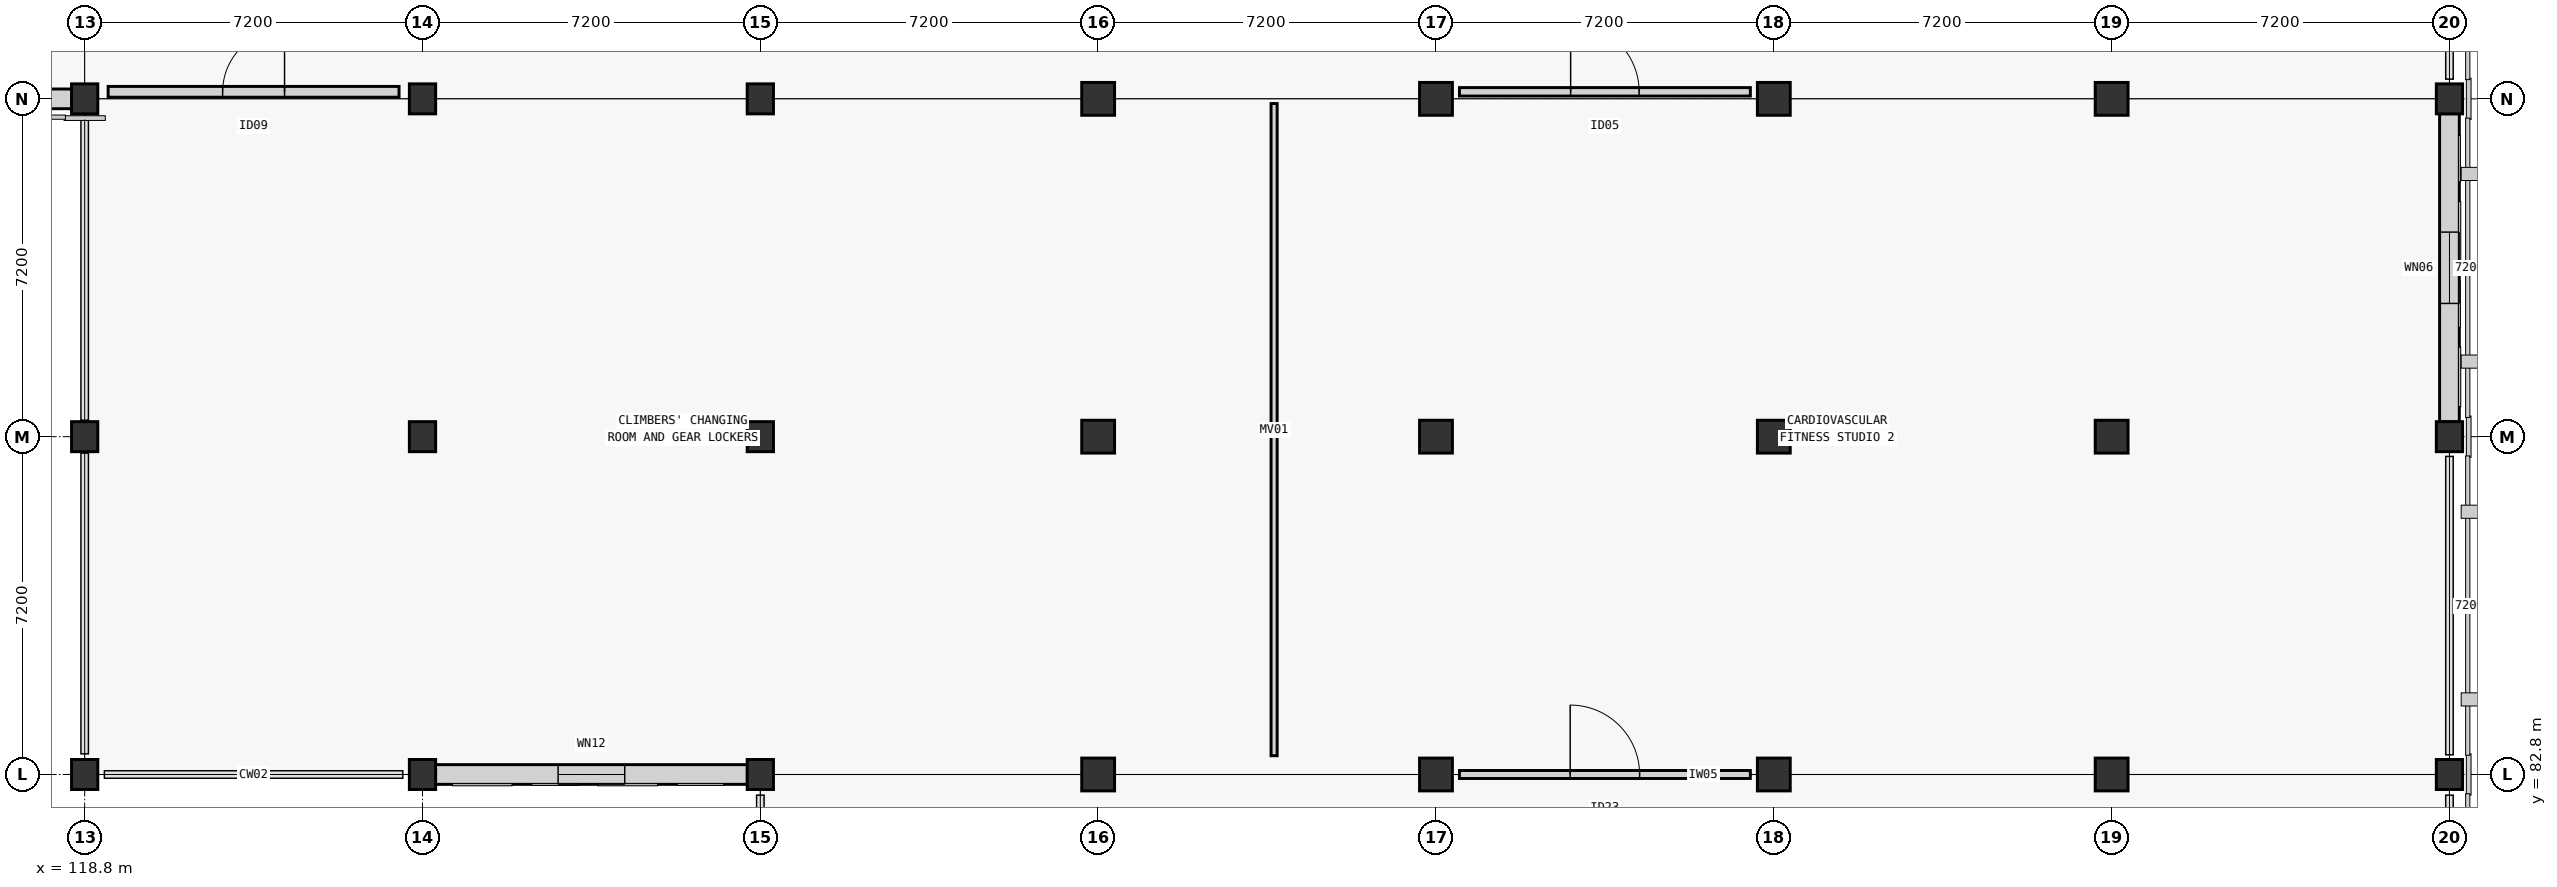
"""IFC4 building model, lengths in metres.
Left out: names, types, materials, properties, quantities, classifications, styles, units other than length and angle.
Written with IfcOpenShell. Run it as: python <this file> out.ifc"""

import sys

from ifc_helpers import new_model, si_unit, direction, frame, frame_2d, origin, origin_2d, place, context, subcontext, project, spatial, rectangle, extrude, element, fill, save


model = new_model("IFC4")
c1 = context("Model", 3, precision=1e-05, world=origin(), true_north=direction((0.0, 1.0)))
c2 = subcontext(c1, "Body", "Model", "MODEL_VIEW")
j1 = project(units=[si_unit("LENGTHUNIT", "METRE"), si_unit("PLANEANGLEUNIT", "RADIAN")], contexts=[c1])
p1 = place(None, origin())
s1 = spatial("IfcSite", under=j1, at=p1, CompositionType="ELEMENT")
p2 = place(p1, origin())
s2 = spatial("IfcBuilding", under=s1, at=p2, CompositionType="ELEMENT")
p3 = place(p2, origin())
s3 = spatial("IfcBuildingStorey", under=s2, at=p3, CompositionType="ELEMENT", Elevation=0.0)
for number, where, z_axis, x_axis in (
    (1, (118.8, 82.8, -0.3), (0.0, 0.0, 1.0), (1.0, 0.0, 0.0)),
    (2, (118.8, 90.0, -0.3), (0.0, 0.0, 1.0), (1.0, 0.0, 0.0)),
    (3, (118.8, 97.2, -0.3), (0.0, 0.0, 1.0), (1.0, 0.0, 0.0)),
    (4, (126.0, 82.8, -0.3), (0.0, 0.0, 1.0), (1.0, 0.0, 0.0)),
    (5, (126.0, 90.0, -0.3), (0.0, 0.0, 1.0), (1.0, 0.0, 0.0)),
    (6, (126.0, 97.2, -0.3), (0.0, 0.0, 1.0), (1.0, 0.0, 0.0)),
    (7, (133.2, 82.8, -0.3), (0.0, 0.0, 1.0), (1.0, 0.0, 0.0)),
    (8, (133.2, 90.0, -0.3), (0.0, 0.0, 1.0), (1.0, 0.0, 0.0)),
    (9, (133.2, 97.2, -0.3), (0.0, 0.0, 1.0), (1.0, 0.0, 0.0)),
):
    element("IfcColumn", number, at=place(p3, frame(where, z_axis=z_axis, x_axis=x_axis)), inside=s3, PredefinedType="COLUMN", context=c2, shape_type="SweptSolid", body=[
        extrude(rectangle(XDim=0.56, YDim=0.64, at=origin_2d()), origin(), (0.0, 0.0, 1.0), 5.7),
    ])
for number, where, z_axis, x_axis in (
    (10, (140.4, 82.8, -0.3), (0.0, 0.0, 1.0), (1.0, 0.0, 0.0)),
    (11, (140.4, 90.0, -0.3), (0.0, 0.0, 1.0), (1.0, 0.0, 0.0)),
    (12, (140.4, 97.2, -0.3), (0.0, 0.0, 1.0), (1.0, 0.0, 0.0)),
    (13, (147.6, 82.8, -0.3), (0.0, 0.0, 1.0), (1.0, 0.0, 0.0)),
    (14, (147.6, 90.0, -0.3), (0.0, 0.0, 1.0), (1.0, 0.0, 0.0)),
    (15, (147.6, 97.2, -0.3), (0.0, 0.0, 1.0), (1.0, 0.0, 0.0)),
    (16, (154.8, 82.8, -0.3), (0.0, 0.0, 1.0), (1.0, 0.0, 0.0)),
    (17, (154.8, 90.0, -0.3), (0.0, 0.0, 1.0), (1.0, 0.0, 0.0)),
    (18, (154.8, 97.2, -0.3), (0.0, 0.0, 1.0), (1.0, 0.0, 0.0)),
    (19, (162.0, 82.8, -0.3), (0.0, 0.0, 1.0), (1.0, 0.0, 0.0)),
    (20, (162.0, 90.0, -0.3), (0.0, 0.0, 1.0), (1.0, 0.0, 0.0)),
    (21, (162.0, 97.2, -0.3), (0.0, 0.0, 1.0), (1.0, 0.0, 0.0)),
):
    element("IfcColumn", number, at=place(p3, frame(where, z_axis=z_axis, x_axis=x_axis)), inside=s3, PredefinedType="COLUMN", context=c2, shape_type="SweptSolid", body=[
        extrude(rectangle(XDim=0.7, YDim=0.7, at=origin_2d()), origin(), (0.0, 0.0, 1.0), 5.7),
    ])
for number, where, z_axis, x_axis in (
    (22, (169.2, 82.8, -0.3), (0.0, 0.0, 1.0), (1.0, 0.0, 0.0)),
    (23, (169.2, 90.0, -0.3), (0.0, 0.0, 1.0), (1.0, 0.0, 0.0)),
    (24, (169.2, 97.2, -0.3), (0.0, 0.0, 1.0), (1.0, 0.0, 0.0)),
):
    element("IfcColumn", number, at=place(p3, frame(where, z_axis=z_axis, x_axis=x_axis)), inside=s3, PredefinedType="COLUMN", context=c2, shape_type="SweptSolid", body=[
        extrude(rectangle(XDim=0.56, YDim=0.64, at=origin_2d()), origin(), (0.0, 0.0, 1.0), 5.7),
    ])
p4 = place(p3, frame((169.2, 96.884, 0.0), z_axis=(0.0, 0.0, 1.0), x_axis=(0.0, -1.0, 0.0)))
e25 = element("IfcWall", 25, at=p4, inside=s3, PredefinedType="STANDARD", context=c2, shape_type="SweptSolid", body=[
    extrude(rectangle(XDim=6.568, YDim=0.42, at=frame_2d((3.284, 0.0))), origin(), (0.0, 0.0, 1.0), 4.505),
])
p5 = place(p4, frame((2.524, 0.0, 0.9)))
e26 = element("IfcOpeningElement", 26, at=p5, cuts=e25, PredefinedType="OPENING", context=c2, shape_type="SweptSolid", body=[
    extrude(rectangle(XDim=1.52, YDim=2.75, at=frame_2d((0.76, 1.375))), frame((0.0, 0.21, 0.0), z_axis=(0.0, -1.0, 0.0), x_axis=(1.0, 0.0, 0.0)), (0.0, 0.0, 1.0), 0.42),
])
p6 = place(p3, frame((118.524, 97.2, 0.0), z_axis=(0.0, 0.0, 1.0), x_axis=(-1.0, 0.0, 0.0)))
e27 = element("IfcWall", 27, at=p6, inside=s3, PredefinedType="STANDARD", context=c2, shape_type="SweptSolid", body=[
    extrude(rectangle(XDim=6.648, YDim=0.42, at=frame_2d((3.324, 0.0))), origin(), (0.0, 0.0, 1.0), 4.515),
])
p7 = place(p6, frame((1.799, 0.0, 0.9)))
e28 = element("IfcOpeningElement", 28, at=p7, cuts=e27, PredefinedType="OPENING", context=c2, shape_type="SweptSolid", body=[
    extrude(rectangle(XDim=3.05, YDim=1.62, at=frame_2d((1.525, 0.81))), frame((0.0, 0.21, 0.0), z_axis=(0.0, -1.0, 0.0), x_axis=(1.0, 0.0, 0.0)), (0.0, 0.0, 1.0), 0.42),
])
p8 = place(p3, frame((132.924, 82.8, 0.0), z_axis=(0.0, 0.0, 1.0), x_axis=(-1.0, 0.0, 0.0)))
e29 = element("IfcWall", 29, at=p8, inside=s3, PredefinedType="STANDARD", context=c2, shape_type="SweptSolid", body=[
    extrude(rectangle(XDim=6.648, YDim=0.42, at=frame_2d((3.324, 0.0))), origin(), (0.0, 0.0, 1.0), 4.505),
])
p9 = place(p8, frame((2.614, 0.0, 0.9)))
e30 = element("IfcOpeningElement", 30, at=p9, cuts=e29, PredefinedType="OPENING", context=c2, shape_type="SweptSolid", body=[
    extrude(rectangle(XDim=1.42, YDim=1.62, at=frame_2d((0.71, 0.81))), frame((0.0, 0.21, 0.0), z_axis=(0.0, -1.0, 0.0), x_axis=(1.0, 0.0, 0.0)), (0.0, 0.0, 1.0), 0.42),
])
p10 = place(p3, frame((148.1, 82.8, 0.0), z_axis=(0.0, 0.0, 1.0), x_axis=(1.0, 0.0, 0.0)))
e31 = element("IfcWall", 31, at=p10, inside=s3, PredefinedType="STANDARD", context=c2, shape_type="SweptSolid", body=[
    extrude(rectangle(XDim=6.2, YDim=0.17, at=frame_2d((3.1, 0.0))), origin(), (0.0, 0.0, 1.0), 4.2),
])
p11 = place(p10, frame((2.36, 0.0, 0.0)))
e32 = element("IfcOpeningElement", 32, at=p11, cuts=e31, PredefinedType="OPENING", context=c2, shape_type="SweptSolid", body=[
    extrude(rectangle(XDim=1.48, YDim=2.22, at=frame_2d((0.74, 1.11))), frame((0.0, 0.085, 0.0), z_axis=(0.0, -1.0, 0.0), x_axis=(1.0, 0.0, 0.0)), (0.0, 0.0, 1.0), 0.17),
])
p12 = place(p3, frame((119.3, 97.35, 0.0), z_axis=(0.0, 0.0, 1.0), x_axis=(1.0, 0.0, 0.0)))
e33 = element("IfcWall", 33, at=p12, inside=s3, PredefinedType="PLUMBINGWALL", context=c2, shape_type="SweptSolid", body=[
    extrude(rectangle(XDim=6.2, YDim=0.23, at=frame_2d((3.1, 0.0))), origin(), (0.0, 0.0, 1.0), 4.2),
])
p13 = place(p12, frame((2.44, 0.0, 0.0)))
e34 = element("IfcOpeningElement", 34, at=p13, cuts=e33, PredefinedType="OPENING", context=c2, shape_type="SweptSolid", body=[
    extrude(rectangle(XDim=1.32, YDim=2.16, at=frame_2d((0.66, 1.08))), frame((0.0, 0.115, 0.0), z_axis=(0.0, -1.0, 0.0), x_axis=(1.0, 0.0, 0.0)), (0.0, 0.0, 1.0), 0.23),
])
p14 = place(p3, frame((148.1, 97.35, 0.0), z_axis=(0.0, 0.0, 1.0), x_axis=(1.0, 0.0, 0.0)))
e35 = element("IfcWall", 35, at=p14, inside=s3, PredefinedType="STANDARD", context=c2, shape_type="SweptSolid", body=[
    extrude(rectangle(XDim=6.2, YDim=0.18, at=frame_2d((3.1, 0.0))), origin(), (0.0, 0.0, 1.0), 4.2),
])
p15 = place(p14, frame((2.37, 0.0, 0.0)))
e36 = element("IfcOpeningElement", 36, at=p15, cuts=e35, PredefinedType="OPENING", context=c2, shape_type="SweptSolid", body=[
    extrude(rectangle(XDim=1.46, YDim=2.24, at=frame_2d((0.73, 1.12))), frame((0.0, 0.09, 0.0), z_axis=(0.0, -1.0, 0.0), x_axis=(1.0, 0.0, 0.0)), (0.0, 0.0, 1.0), 0.18),
])
p16 = place(p3, frame((144.15, 83.2, 0.0), z_axis=(0.0, 0.0, 1.0), x_axis=(0.0, 1.0, 0.0)))
e37 = element("IfcWall", 37, at=p16, inside=s3, PredefinedType="MOVABLE", context=c2, shape_type="SweptSolid", body=[
    extrude(rectangle(XDim=13.9, YDim=0.13, at=frame_2d((6.95, 0.0))), origin(), (0.0, 0.0, 1.0), 4.2),
])
p17 = place(p5, origin())
e38 = element("IfcWindow", 38, at=p17, inside=s3, PartitioningType="SINGLE_PANEL", PredefinedType="WINDOW", context=c2, shape_type="SweptSolid", body=[
    extrude(rectangle(XDim=1.52, YDim=2.75, at=frame_2d((0.76, 1.375))), frame((0.0, 0.03, 0.0), z_axis=(0.0, -1.0, 0.0), x_axis=(1.0, 0.0, 0.0)), (0.0, 0.0, 1.0), 0.06),
])
fill(e26, e38)
p18 = place(p9, origin())
e39 = element("IfcWindow", 39, at=p18, inside=s3, PartitioningType="SINGLE_PANEL", PredefinedType="WINDOW", context=c2, shape_type="SweptSolid", body=[
    extrude(rectangle(XDim=1.42, YDim=1.62, at=frame_2d((0.71, 0.81))), frame((0.0, 0.03, 0.0), z_axis=(0.0, -1.0, 0.0), x_axis=(1.0, 0.0, 0.0)), (0.0, 0.0, 1.0), 0.06),
])
fill(e30, e39)
p19 = place(p11, origin())
e40 = element("IfcDoor", 40, at=p19, inside=s3, OperationType="SINGLE_SWING_LEFT", PredefinedType="DOOR", context=c2, shape_type="SweptSolid", body=[
    extrude(rectangle(XDim=1.48, YDim=2.22, at=frame_2d((0.74, 1.11))), frame((0.0, 0.025, 0.0), z_axis=(0.0, -1.0, 0.0), x_axis=(1.0, 0.0, 0.0)), (0.0, 0.0, 1.0), 0.05),
])
fill(e32, e40)
p20 = place(p13, origin())
e41 = element("IfcDoor", 41, at=p20, inside=s3, OperationType="SINGLE_SWING_RIGHT", PredefinedType="DOOR", context=c2, shape_type="SweptSolid", body=[
    extrude(rectangle(XDim=1.32, YDim=2.16, at=frame_2d((0.66, 1.08))), frame((0.0, 0.025, 0.0), z_axis=(0.0, -1.0, 0.0), x_axis=(1.0, 0.0, 0.0)), (0.0, 0.0, 1.0), 0.05),
])
fill(e34, e41)
p21 = place(p15, origin())
e42 = element("IfcDoor", 42, at=p21, inside=s3, OperationType="SINGLE_SWING_LEFT", PredefinedType="DOOR", context=c2, shape_type="SweptSolid", body=[
    extrude(rectangle(XDim=1.46, YDim=2.24, at=frame_2d((0.73, 1.12))), frame((0.0, 0.025, 0.0), z_axis=(0.0, -1.0, 0.0), x_axis=(1.0, 0.0, 0.0)), (0.0, 0.0, 1.0), 0.05),
])
fill(e36, e42)
save(model, sys.argv[1])
